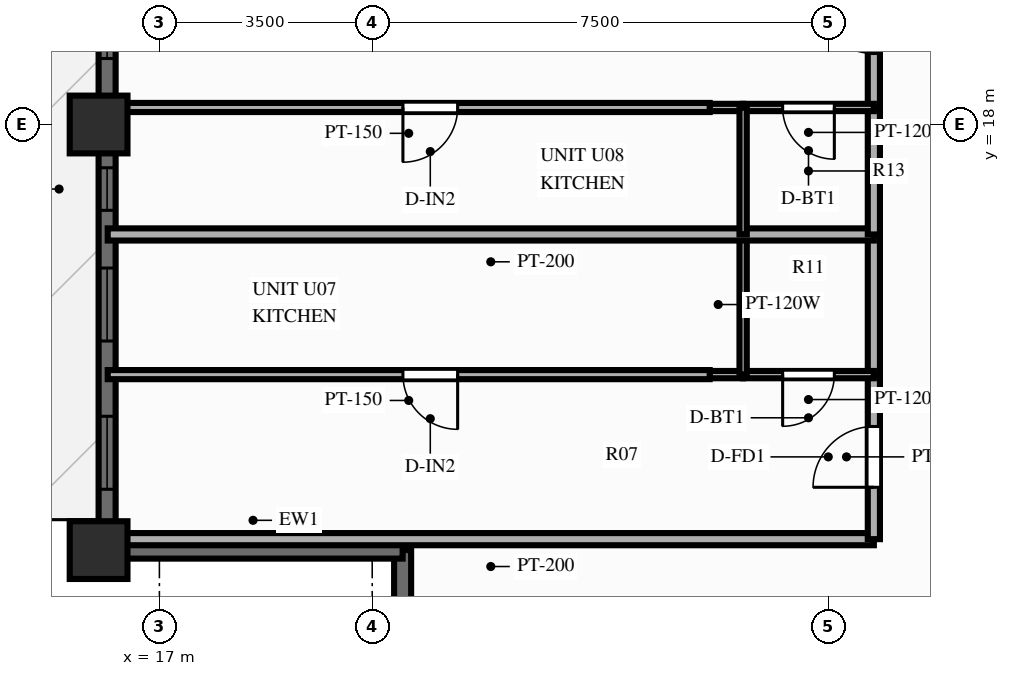
"""IFC4 building model, lengths in metres.
Left out: names, types, materials, properties, quantities, classifications, styles, units other than length and angle.
Written with IfcOpenShell. Run it as: python <this file> out.ifc"""

import sys

from ifc_helpers import new_model, si_unit, direction, frame, frame_2d, origin, origin_2d, place, context, subcontext, project, spatial, rectangle, extrude, source, transform, mapped, element, fill, save


model = new_model("IFC4")
c1 = context("Model", 3, precision=1e-05, world=origin(), true_north=direction((0.0, 1.0)))
c2 = subcontext(c1, "Body", "Model", "MODEL_VIEW")
j1 = project(units=[si_unit("LENGTHUNIT", "METRE"), si_unit("PLANEANGLEUNIT", "RADIAN")], contexts=[c1])
p1 = place(None, origin())
s1 = spatial("IfcSite", under=j1, at=p1, CompositionType="ELEMENT")
p2 = place(p1, origin())
s2 = spatial("IfcBuilding", under=s1, at=p2, CompositionType="ELEMENT")
p3 = place(p2, frame((0.0, 0.0, 163.0)))
s3 = spatial("IfcBuildingStorey", under=s2, at=p3, CompositionType="ELEMENT", Elevation=163.0)
m1 = source(origin(), c2, "Body", "SweptSolid", [
    extrude(rectangle(XDim=0.95, YDim=0.95, at=origin_2d()), origin(), (0.0, 0.0, 1.0), 3.0),
])
for number, where, z_axis, x_axis in (
    (1, (16.0, 18.0, 0.0), (0.0, 0.0, 1.0), (1.0, 0.0, 0.0)),
    (2, (16.0, 11.0, 0.0), (0.0, 0.0, 1.0), (1.0, 0.0, 0.0)),
):
    element("IfcColumn", number, at=place(p3, frame(where, z_axis=z_axis, x_axis=x_axis)), inside=s3, PredefinedType="COLUMN", context=c2, shape_type="MappedRepresentation", body=[
        mapped(m1, transform((0.0, 0.0, 0.0), scale=1.0)),
    ])
p4 = place(p3, frame((16.14, 11.0, 0.0), z_axis=(0.0, 0.0, 1.0), x_axis=(0.0, 1.0, 0.0)))
e3 = element("IfcWall", 3, at=p4, inside=s3, PredefinedType="SOLIDWALL", context=c2, shape_type="SweptSolid", body=[
    extrude(rectangle(XDim=32.0, YDim=0.28, at=frame_2d((16.0, 0.0))), origin(), (0.0, 0.0, 1.0), 2.28),
])
p5 = place(p4, frame((1.001, 0.0, 0.25)))
e4 = element("IfcOpeningElement", 4, at=p5, cuts=e3, PredefinedType="OPENING", context=c2, shape_type="SweptSolid", body=[
    extrude(rectangle(XDim=1.2, YDim=1.5, at=frame_2d((0.6, 0.75))), frame((0.0, 0.152, 0.0), z_axis=(0.0, -1.0, 0.0), x_axis=(1.0, 0.0, 0.0)), (0.0, 0.0, 1.0), 0.304),
])
p6 = place(p4, frame((3.439, 0.0, 0.25)))
e5 = element("IfcOpeningElement", 5, at=p6, cuts=e3, PredefinedType="OPENING", context=c2, shape_type="SweptSolid", body=[
    extrude(rectangle(XDim=1.2, YDim=1.5, at=frame_2d((0.6, 0.75))), frame((0.0, 0.152, 0.0), z_axis=(0.0, -1.0, 0.0), x_axis=(1.0, 0.0, 0.0)), (0.0, 0.0, 1.0), 0.304),
])
p7 = place(p4, frame((5.588, 0.0, 0.25)))
e6 = element("IfcOpeningElement", 6, at=p7, cuts=e3, PredefinedType="OPENING", context=c2, shape_type="SweptSolid", body=[
    extrude(rectangle(XDim=0.7, YDim=1.5, at=frame_2d((0.35, 0.75))), frame((0.0, 0.152, 0.0), z_axis=(0.0, -1.0, 0.0), x_axis=(1.0, 0.0, 0.0)), (0.0, 0.0, 1.0), 0.304),
])
p8 = place(p4, frame((8.085, 0.0, 0.25)))
e7 = element("IfcOpeningElement", 7, at=p8, cuts=e3, PredefinedType="OPENING", context=c2, shape_type="SweptSolid", body=[
    extrude(rectangle(XDim=1.2, YDim=1.5, at=frame_2d((0.6, 0.75))), frame((0.0, 0.152, 0.0), z_axis=(0.0, -1.0, 0.0), x_axis=(1.0, 0.0, 0.0)), (0.0, 0.0, 1.0), 0.304),
])
p9 = place(p4, frame((10.575, 0.0, 0.25)))
e8 = element("IfcOpeningElement", 8, at=p9, cuts=e3, PredefinedType="OPENING", context=c2, shape_type="SweptSolid", body=[
    extrude(rectangle(XDim=1.2, YDim=1.5, at=frame_2d((0.6, 0.75))), frame((0.0, 0.152, 0.0), z_axis=(0.0, -1.0, 0.0), x_axis=(1.0, 0.0, 0.0)), (0.0, 0.0, 1.0), 0.304),
])
p10 = place(p4, frame((13.007, 0.0, 0.25)))
e9 = element("IfcOpeningElement", 9, at=p10, cuts=e3, PredefinedType="OPENING", context=c2, shape_type="SweptSolid", body=[
    extrude(rectangle(XDim=1.2, YDim=1.5, at=frame_2d((0.6, 0.75))), frame((0.0, 0.152, 0.0), z_axis=(0.0, -1.0, 0.0), x_axis=(1.0, 0.0, 0.0)), (0.0, 0.0, 1.0), 0.304),
])
p11 = place(p4, frame((15.4, 0.0, 0.25)))
e10 = element("IfcOpeningElement", 10, at=p11, cuts=e3, PredefinedType="OPENING", context=c2, shape_type="SweptSolid", body=[
    extrude(rectangle(XDim=1.2, YDim=1.5, at=frame_2d((0.6, 0.75))), frame((0.0, 0.152, 0.0), z_axis=(0.0, -1.0, 0.0), x_axis=(1.0, 0.0, 0.0)), (0.0, 0.0, 1.0), 0.304),
])
p12 = place(p4, frame((17.673, 0.0, 0.0)))
e11 = element("IfcOpeningElement", 11, at=p12, cuts=e3, PredefinedType="OPENING", context=c2, shape_type="SweptSolid", body=[
    extrude(rectangle(XDim=1.6, YDim=2.15, at=frame_2d((0.8, 1.075))), frame((0.0, 0.152, 0.0), z_axis=(0.0, -1.0, 0.0), x_axis=(1.0, 0.0, 0.0)), (0.0, 0.0, 1.0), 0.304),
])
p13 = place(p4, frame((20.452, 0.0, 0.25)))
e12 = element("IfcOpeningElement", 12, at=p13, cuts=e3, PredefinedType="OPENING", context=c2, shape_type="SweptSolid", body=[
    extrude(rectangle(XDim=1.2, YDim=1.5, at=frame_2d((0.6, 0.75))), frame((0.0, 0.152, 0.0), z_axis=(0.0, -1.0, 0.0), x_axis=(1.0, 0.0, 0.0)), (0.0, 0.0, 1.0), 0.304),
])
p14 = place(p4, frame((22.862, 0.0, 0.25)))
e13 = element("IfcOpeningElement", 13, at=p14, cuts=e3, PredefinedType="OPENING", context=c2, shape_type="SweptSolid", body=[
    extrude(rectangle(XDim=1.2, YDim=1.5, at=frame_2d((0.6, 0.75))), frame((0.0, 0.152, 0.0), z_axis=(0.0, -1.0, 0.0), x_axis=(1.0, 0.0, 0.0)), (0.0, 0.0, 1.0), 0.304),
])
p15 = place(p4, frame((25.734, 0.0, 0.25)))
e14 = element("IfcOpeningElement", 14, at=p15, cuts=e3, PredefinedType="OPENING", context=c2, shape_type="SweptSolid", body=[
    extrude(rectangle(XDim=0.95, YDim=1.5, at=frame_2d((0.475, 0.75))), frame((0.0, 0.152, 0.0), z_axis=(0.0, -1.0, 0.0), x_axis=(1.0, 0.0, 0.0)), (0.0, 0.0, 1.0), 0.304),
])
p16 = place(p4, frame((27.588, 0.0, 0.25)))
e15 = element("IfcOpeningElement", 15, at=p16, cuts=e3, PredefinedType="OPENING", context=c2, shape_type="SweptSolid", body=[
    extrude(rectangle(XDim=1.2, YDim=1.5, at=frame_2d((0.6, 0.75))), frame((0.0, 0.152, 0.0), z_axis=(0.0, -1.0, 0.0), x_axis=(1.0, 0.0, 0.0)), (0.0, 0.0, 1.0), 0.304),
])
p17 = place(p4, frame((29.879, 0.0, 0.25)))
e16 = element("IfcOpeningElement", 16, at=p17, cuts=e3, PredefinedType="OPENING", context=c2, shape_type="SweptSolid", body=[
    extrude(rectangle(XDim=1.2, YDim=1.5, at=frame_2d((0.6, 0.75))), frame((0.0, 0.152, 0.0), z_axis=(0.0, -1.0, 0.0), x_axis=(1.0, 0.0, 0.0)), (0.0, 0.0, 1.0), 0.304),
])
for number, where, z_axis, x_axis in (
    (17, (21.0, 6.08, 0.0), (0.0, 0.0, 1.0), (0.0, 1.0, 0.0)),
    (18, (16.08, 11.0, 0.0), (0.0, 0.0, 1.0), (1.0, 0.0, 0.0)),
):
    element("IfcWall", number, at=place(p3, frame(where, z_axis=z_axis, x_axis=x_axis)), inside=s3, PredefinedType="SOLIDWALL", context=c2, shape_type="SweptSolid", body=[
        extrude(rectangle(XDim=4.92, YDim=0.28, at=frame_2d((2.46, 0.0))), origin(), (0.0, 0.0, 1.0), 2.28),
    ])
p18 = place(p3, frame((28.75, 11.18, 0.0), z_axis=(0.0, 0.0, 1.0), x_axis=(-1.0, 0.0, 0.0)))
e19 = element("IfcWall", 19, at=p18, inside=s3, PredefinedType="PARTITIONING", context=c2, shape_type="SweptSolid", body=[
    extrude(rectangle(XDim=12.6, YDim=0.2, at=frame_2d((6.3, 0.0))), origin(), (0.0, 0.0, 1.0), 2.79),
])
p19 = place(p3, frame((28.75, 11.18, 0.0), z_axis=(0.0, 0.0, 1.0), x_axis=(0.0, 1.0, 0.0)))
e20 = element("IfcWall", 20, at=p19, inside=s3, PredefinedType="PARTITIONING", context=c2, shape_type="SweptSolid", body=[
    extrude(rectangle(XDim=2.706, YDim=0.2, at=frame_2d((1.353, 0.0))), origin(), (0.0, 0.0, 1.0), 2.79),
])
p20 = place(p19, frame((0.853, 0.0, 0.0)))
e21 = element("IfcOpeningElement", 21, at=p20, cuts=e20, PredefinedType="OPENING", context=c2, shape_type="SweptSolid", body=[
    extrude(rectangle(XDim=1.0, YDim=2.15, at=frame_2d((0.5, 1.075))), frame((0.0, 0.112, 0.0), z_axis=(0.0, -1.0, 0.0), x_axis=(1.0, 0.0, 0.0)), (0.0, 0.0, 1.0), 0.224),
])
p21 = place(p3, frame((28.75, 13.886, 0.0), z_axis=(0.0, 0.0, 1.0), x_axis=(0.0, 1.0, 0.0)))
e22 = element("IfcWall", 22, at=p21, inside=s3, PredefinedType="PARTITIONING", context=c2, shape_type="SweptSolid", body=[
    extrude(rectangle(XDim=2.305, YDim=0.2, at=frame_2d((1.153, 0.0))), origin(), (0.0, 0.0, 1.0), 2.79),
])
p22 = place(p3, frame((28.75, 13.886, 0.0), z_axis=(0.0, 0.0, 1.0), x_axis=(-1.0, 0.0, 0.0)))
e23 = element("IfcWall", 23, at=p22, inside=s3, PredefinedType="PARTITIONING", context=c2, shape_type="SweptSolid", body=[
    extrude(rectangle(XDim=2.15, YDim=0.12, at=frame_2d((1.075, 0.0))), origin(), (0.0, 0.0, 1.0), 2.79),
])
p23 = place(p22, frame((0.65, 0.0, 0.0)))
e24 = element("IfcOpeningElement", 24, at=p23, cuts=e23, PredefinedType="OPENING", context=c2, shape_type="SweptSolid", body=[
    extrude(rectangle(XDim=0.85, YDim=2.05, at=frame_2d((0.425, 1.025))), frame((0.0, 0.072, 0.0), z_axis=(0.0, -1.0, 0.0), x_axis=(1.0, 0.0, 0.0)), (0.0, 0.0, 1.0), 0.144),
])
p24 = place(p3, frame((26.6, 13.886, 0.0), z_axis=(0.0, 0.0, 1.0), x_axis=(-1.0, 0.0, 0.0)))
e25 = element("IfcWall", 25, at=p24, inside=s3, PredefinedType="PARTITIONING", context=c2, shape_type="SweptSolid", body=[
    extrude(rectangle(XDim=0.55, YDim=0.12, at=frame_2d((0.275, 0.0))), origin(), (0.0, 0.0, 1.0), 2.79),
])
p25 = place(p3, frame((26.6, 13.886, 0.0), z_axis=(0.0, 0.0, 1.0), x_axis=(0.0, 1.0, 0.0)))
e26 = element("IfcWall", 26, at=p25, inside=s3, PredefinedType="PARTITIONING", context=c2, shape_type="SweptSolid", body=[
    extrude(rectangle(XDim=2.305, YDim=0.12, at=frame_2d((1.153, 0.0))), origin(), (0.0, 0.0, 1.0), 2.79),
])
p26 = place(p3, frame((26.05, 13.886, 0.0), z_axis=(0.0, 0.0, 1.0), x_axis=(-1.0, 0.0, 0.0)))
e27 = element("IfcWall", 27, at=p26, inside=s3, PredefinedType="PARTITIONING", context=c2, shape_type="SweptSolid", body=[
    extrude(rectangle(XDim=9.9, YDim=0.15, at=frame_2d((4.95, 0.0))), origin(), (0.0, 0.0, 1.0), 2.79),
])
p27 = place(p26, frame((4.145, 0.0, 0.0)))
e28 = element("IfcOpeningElement", 28, at=p27, cuts=e27, PredefinedType="OPENING", context=c2, shape_type="SweptSolid", body=[
    extrude(rectangle(XDim=0.9, YDim=2.1, at=frame_2d((0.45, 1.05))), frame((0.0, 0.087, 0.0), z_axis=(0.0, -1.0, 0.0), x_axis=(1.0, 0.0, 0.0)), (0.0, 0.0, 1.0), 0.174),
])
p28 = place(p3, frame((28.75, 16.192, 0.0), z_axis=(0.0, 0.0, 1.0), x_axis=(-1.0, 0.0, 0.0)))
e29 = element("IfcWall", 29, at=p28, inside=s3, PredefinedType="PARTITIONING", context=c2, shape_type="SweptSolid", body=[
    extrude(rectangle(XDim=12.6, YDim=0.2, at=frame_2d((6.3, 0.0))), origin(), (0.0, 0.0, 1.0), 2.79),
])
p29 = place(p3, frame((28.75, 16.192, 0.0), z_axis=(0.0, 0.0, 1.0), x_axis=(0.0, 1.0, 0.0)))
e30 = element("IfcWall", 30, at=p29, inside=s3, PredefinedType="PARTITIONING", context=c2, shape_type="SweptSolid", body=[
    extrude(rectangle(XDim=2.088, YDim=0.2, at=frame_2d((1.044, 0.0))), origin(), (0.0, 0.0, 1.0), 2.79),
])
p30 = place(p3, frame((28.75, 18.28, 0.0), z_axis=(0.0, 0.0, 1.0), x_axis=(0.0, 1.0, 0.0)))
e31 = element("IfcWall", 31, at=p30, inside=s3, PredefinedType="PARTITIONING", context=c2, shape_type="SweptSolid", body=[
    extrude(rectangle(XDim=2.776, YDim=0.2, at=frame_2d((1.388, 0.0))), origin(), (0.0, 0.0, 1.0), 2.79),
])
p31 = place(p30, frame((0.888, 0.0, 0.0)))
e32 = element("IfcOpeningElement", 32, at=p31, cuts=e31, PredefinedType="OPENING", context=c2, shape_type="SweptSolid", body=[
    extrude(rectangle(XDim=1.0, YDim=2.15, at=frame_2d((0.5, 1.075))), frame((0.0, 0.112, 0.0), z_axis=(0.0, -1.0, 0.0), x_axis=(1.0, 0.0, 0.0)), (0.0, 0.0, 1.0), 0.224),
])
p32 = place(p3, frame((28.75, 18.28, 0.0), z_axis=(0.0, 0.0, 1.0), x_axis=(-1.0, 0.0, 0.0)))
e33 = element("IfcWall", 33, at=p32, inside=s3, PredefinedType="PARTITIONING", context=c2, shape_type="SweptSolid", body=[
    extrude(rectangle(XDim=2.15, YDim=0.12, at=frame_2d((1.075, 0.0))), origin(), (0.0, 0.0, 1.0), 2.79),
])
p33 = place(p32, frame((0.65, 0.0, 0.0)))
e34 = element("IfcOpeningElement", 34, at=p33, cuts=e33, PredefinedType="OPENING", context=c2, shape_type="SweptSolid", body=[
    extrude(rectangle(XDim=0.85, YDim=2.05, at=frame_2d((0.425, 1.025))), frame((0.0, 0.072, 0.0), z_axis=(0.0, -1.0, 0.0), x_axis=(1.0, 0.0, 0.0)), (0.0, 0.0, 1.0), 0.144),
])
p34 = place(p3, frame((26.6, 18.28, 0.0), z_axis=(0.0, 0.0, 1.0), x_axis=(-1.0, 0.0, 0.0)))
e35 = element("IfcWall", 35, at=p34, inside=s3, PredefinedType="PARTITIONING", context=c2, shape_type="SweptSolid", body=[
    extrude(rectangle(XDim=0.55, YDim=0.12, at=frame_2d((0.275, 0.0))), origin(), (0.0, 0.0, 1.0), 2.79),
])
p35 = place(p3, frame((26.6, 16.192, 0.0), z_axis=(0.0, 0.0, 1.0), x_axis=(0.0, 1.0, 0.0)))
e36 = element("IfcWall", 36, at=p35, inside=s3, PredefinedType="PARTITIONING", context=c2, shape_type="SweptSolid", body=[
    extrude(rectangle(XDim=2.088, YDim=0.12, at=frame_2d((1.044, 0.0))), origin(), (0.0, 0.0, 1.0), 2.79),
])
p36 = place(p3, frame((26.05, 18.28, 0.0), z_axis=(0.0, 0.0, 1.0), x_axis=(-1.0, 0.0, 0.0)))
e37 = element("IfcWall", 37, at=p36, inside=s3, PredefinedType="PARTITIONING", context=c2, shape_type="SweptSolid", body=[
    extrude(rectangle(XDim=9.9, YDim=0.15, at=frame_2d((4.95, 0.0))), origin(), (0.0, 0.0, 1.0), 2.79),
])
p37 = place(p36, frame((4.145, 0.0, 0.0)))
e38 = element("IfcOpeningElement", 38, at=p37, cuts=e37, PredefinedType="OPENING", context=c2, shape_type="SweptSolid", body=[
    extrude(rectangle(XDim=0.9, YDim=2.1, at=frame_2d((0.45, 1.05))), frame((0.0, 0.087, 0.0), z_axis=(0.0, -1.0, 0.0), x_axis=(1.0, 0.0, 0.0)), (0.0, 0.0, 1.0), 0.174),
])
m2 = source(origin(), c2, "Body", "SweptSolid", [
    extrude(rectangle(XDim=1.2, YDim=1.5, at=frame_2d((0.6, 0.75))), frame((0.0, 0.03, 0.0), z_axis=(0.0, -1.0, 0.0), x_axis=(1.0, 0.0, 0.0)), (0.0, 0.0, 1.0), 0.06),
])
p38 = place(p5, origin())
e39 = element("IfcWindow", 39, at=p38, inside=s3, PartitioningType="SINGLE_PANEL", PredefinedType="WINDOW", context=c2, shape_type="MappedRepresentation", body=[
    mapped(m2, transform((0.0, 0.0, 0.0), scale=1.0)),
])
fill(e4, e39)
p39 = place(p6, origin())
e40 = element("IfcWindow", 40, at=p39, inside=s3, PartitioningType="SINGLE_PANEL", PredefinedType="WINDOW", context=c2, shape_type="MappedRepresentation", body=[
    mapped(m2, transform((0.0, 0.0, 0.0), scale=1.0)),
])
fill(e5, e40)
m3 = source(origin(), c2, "Body", "SweptSolid", [
    extrude(rectangle(XDim=0.7, YDim=1.5, at=frame_2d((0.35, 0.75))), frame((0.0, 0.03, 0.0), z_axis=(0.0, -1.0, 0.0), x_axis=(1.0, 0.0, 0.0)), (0.0, 0.0, 1.0), 0.06),
])
p40 = place(p7, origin())
e41 = element("IfcWindow", 41, at=p40, inside=s3, PartitioningType="SINGLE_PANEL", PredefinedType="WINDOW", context=c2, shape_type="MappedRepresentation", body=[
    mapped(m3, transform((0.0, 0.0, 0.0), scale=1.0)),
])
fill(e6, e41)
p41 = place(p8, origin())
e42 = element("IfcWindow", 42, at=p41, inside=s3, PartitioningType="SINGLE_PANEL", PredefinedType="WINDOW", context=c2, shape_type="MappedRepresentation", body=[
    mapped(m2, transform((0.0, 0.0, 0.0), scale=1.0)),
])
fill(e7, e42)
m4 = source(origin(), c2, "Body", "SweptSolid", [
    extrude(rectangle(XDim=1.0, YDim=2.15, at=frame_2d((0.5, 1.075))), frame((0.0, 0.025, 0.0), z_axis=(0.0, -1.0, 0.0), x_axis=(1.0, 0.0, 0.0)), (0.0, 0.0, 1.0), 0.05),
])
p42 = place(p20, origin())
e43 = element("IfcDoor", 43, at=p42, inside=s3, OperationType="SINGLE_SWING_LEFT", PredefinedType="DOOR", context=c2, shape_type="MappedRepresentation", body=[
    mapped(m4, transform((0.0, 0.0, 0.0), scale=1.0)),
])
fill(e21, e43)
m5 = source(origin(), c2, "Body", "SweptSolid", [
    extrude(rectangle(XDim=0.85, YDim=2.05, at=frame_2d((0.425, 1.025))), frame((0.0, 0.025, 0.0), z_axis=(0.0, -1.0, 0.0), x_axis=(1.0, 0.0, 0.0)), (0.0, 0.0, 1.0), 0.05),
])
p43 = place(p23, origin())
e44 = element("IfcDoor", 44, at=p43, inside=s3, OperationType="SINGLE_SWING_RIGHT", PredefinedType="DOOR", context=c2, shape_type="MappedRepresentation", body=[
    mapped(m5, transform((0.0, 0.0, 0.0), scale=1.0)),
])
fill(e24, e44)
m6 = source(origin(), c2, "Body", "SweptSolid", [
    extrude(rectangle(XDim=0.9, YDim=2.1, at=frame_2d((0.45, 1.05))), frame((0.0, 0.025, 0.0), z_axis=(0.0, -1.0, 0.0), x_axis=(1.0, 0.0, 0.0)), (0.0, 0.0, 1.0), 0.05),
])
p44 = place(p27, origin())
e45 = element("IfcDoor", 45, at=p44, inside=s3, OperationType="SINGLE_SWING_LEFT", PredefinedType="DOOR", context=c2, shape_type="MappedRepresentation", body=[
    mapped(m6, transform((0.0, 0.0, 0.0), scale=1.0)),
])
fill(e28, e45)
p45 = place(p31, origin())
e46 = element("IfcDoor", 46, at=p45, inside=s3, OperationType="SINGLE_SWING_RIGHT", PredefinedType="DOOR", context=c2, shape_type="MappedRepresentation", body=[
    mapped(m4, transform((0.0, 0.0, 0.0), scale=1.0)),
])
fill(e32, e46)
p46 = place(p33, origin())
e47 = element("IfcDoor", 47, at=p46, inside=s3, OperationType="SINGLE_SWING_LEFT", PredefinedType="DOOR", context=c2, shape_type="MappedRepresentation", body=[
    mapped(m5, transform((0.0, 0.0, 0.0), scale=1.0)),
])
fill(e34, e47)
p47 = place(p37, origin())
e48 = element("IfcDoor", 48, at=p47, inside=s3, OperationType="SINGLE_SWING_RIGHT", PredefinedType="DOOR", context=c2, shape_type="MappedRepresentation", body=[
    mapped(m6, transform((0.0, 0.0, 0.0), scale=1.0)),
])
fill(e38, e48)
save(model, sys.argv[1])
